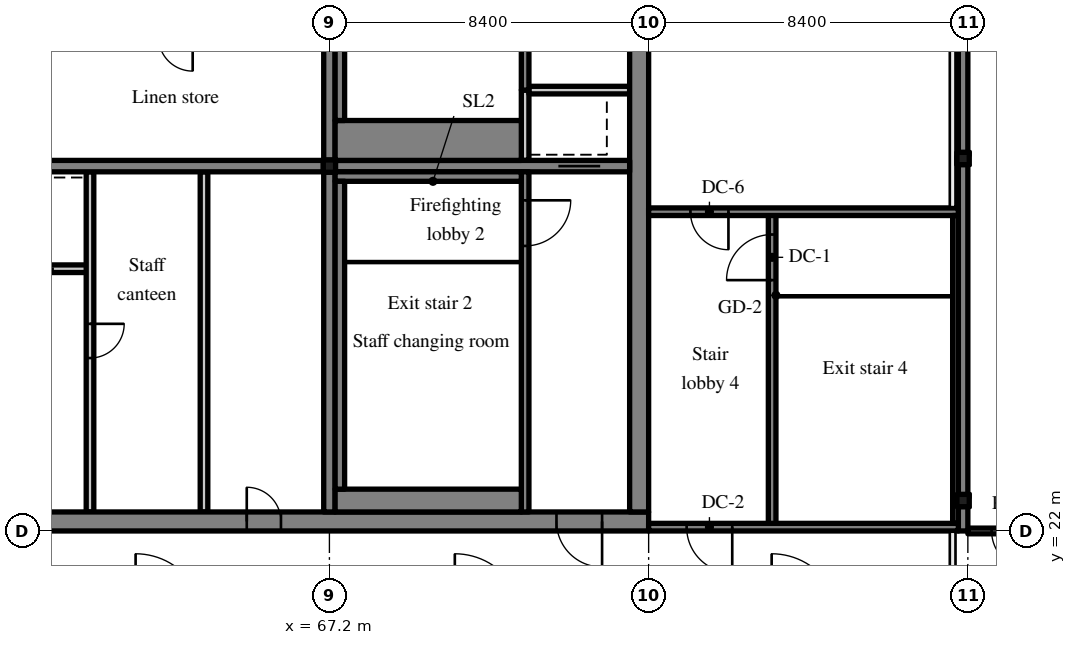
"""IFC4 building model, lengths in metres.
Left out: names, types, materials, properties, quantities, classifications, styles, units other than length and angle.
Written with IfcOpenShell. Run it as: python <this file> out.ifc"""

import sys

from ifc_helpers import new_model, si_unit, direction, frame, frame_2d, origin, origin_2d, place, context, subcontext, project, spatial, rectangle, hollow_circle, extrude, source, transform, mapped, element, fill, save


model = new_model("IFC4")
c1 = context("Model", 3, precision=1e-05, world=origin(), true_north=direction((0.0, 1.0)))
c2 = subcontext(c1, "Body", "Model", "MODEL_VIEW")
j1 = project(units=[si_unit("LENGTHUNIT", "METRE"), si_unit("PLANEANGLEUNIT", "RADIAN")], contexts=[c1])
p1 = place(None, origin())
s1 = spatial("IfcSite", under=j1, at=p1, CompositionType="ELEMENT")
p2 = place(p1, origin())
s2 = spatial("IfcBuilding", under=s1, at=p2, CompositionType="ELEMENT")
p3 = place(p2, frame((0.0, 0.0, 329.7)))
s3 = spatial("IfcBuildingStorey", under=s2, at=p3, CompositionType="ELEMENT", Elevation=329.7)
m1 = source(origin(), c2, "Body", "SweptSolid", [
    extrude(rectangle(XDim=50.4, YDim=0.5, at=frame_2d((25.2, 0.0))), origin(), (0.0, 0.0, 1.0), 4.72),
])
p4 = place(p3, frame((25.2, 22.25, 0.0), z_axis=(0.0, 0.0, 1.0), x_axis=(1.0, 0.0, 0.0)))
e1 = element("IfcWall", 1, at=p4, inside=s3, PredefinedType="SHEAR", context=c2, shape_type="MappedRepresentation", body=[
    mapped(m1, transform((0.0, 0.0, 0.0), scale=1.0)),
])
m2 = source(origin(), c2, "Body", "SweptSolid", [
    extrude(rectangle(XDim=1.8, YDim=2.1, at=frame_2d((0.9, 1.05))), frame((0.0, 0.26, 0.0), z_axis=(0.0, -1.0, 0.0), x_axis=(1.0, 0.0, 0.0)), (0.0, 0.0, 1.0), 0.52),
])
p5 = place(p4, frame((15.9, 0.0, 0.0)))
e2 = element("IfcOpeningElement", 2, at=p5, cuts=e1, PredefinedType="OPENING", context=c2, shape_type="MappedRepresentation", body=[
    mapped(m2, transform((0.0, 0.0, 0.0), scale=1.0)),
])
m3 = source(origin(), c2, "Body", "SweptSolid", [
    extrude(rectangle(XDim=0.9, YDim=2.1, at=frame_2d((0.45, 1.05))), frame((0.0, 0.26, 0.0), z_axis=(0.0, -1.0, 0.0), x_axis=(1.0, 0.0, 0.0)), (0.0, 0.0, 1.0), 0.52),
])
p6 = place(p4, frame((21.525, 0.0, 0.0)))
e3 = element("IfcOpeningElement", 3, at=p6, cuts=e1, PredefinedType="OPENING", context=c2, shape_type="MappedRepresentation", body=[
    mapped(m3, transform((0.0, 0.0, 0.0), scale=1.0)),
])
p7 = place(p4, frame((32.7, 0.0, 0.0)))
e4 = element("IfcOpeningElement", 4, at=p7, cuts=e1, PredefinedType="OPENING", context=c2, shape_type="MappedRepresentation", body=[
    mapped(m2, transform((0.0, 0.0, 0.0), scale=1.0)),
])
p8 = place(p4, frame((39.825, 0.0, 0.0)))
e5 = element("IfcOpeningElement", 5, at=p8, cuts=e1, PredefinedType="OPENING", context=c2, shape_type="MappedRepresentation", body=[
    mapped(m3, transform((0.0, 0.0, 0.0), scale=1.0)),
])
p9 = place(p4, frame((27.975, 0.0, 0.0)))
e6 = element("IfcOpeningElement", 6, at=p9, cuts=e1, PredefinedType="OPENING", context=c2, shape_type="MappedRepresentation", body=[
    mapped(m3, transform((0.0, 0.0, 0.0), scale=1.0)),
])
m4 = source(origin(), c2, "Body", "SweptSolid", [
    extrude(rectangle(XDim=1.2, YDim=2.1, at=frame_2d((0.6, 1.05))), frame((0.0, 0.26, 0.0), z_axis=(0.0, -1.0, 0.0), x_axis=(1.0, 0.0, 0.0)), (0.0, 0.0, 1.0), 0.52),
])
p10 = place(p4, frame((6.5, 0.0, 0.0)))
e7 = element("IfcOpeningElement", 7, at=p10, cuts=e1, PredefinedType="OPENING", context=c2, shape_type="MappedRepresentation", body=[
    mapped(m4, transform((0.0, 0.0, 0.0), scale=1.0)),
])
p11 = place(p4, frame((47.975, 0.0, 0.0)))
e8 = element("IfcOpeningElement", 8, at=p11, cuts=e1, PredefinedType="OPENING", context=c2, shape_type="MappedRepresentation", body=[
    mapped(m4, transform((0.0, 0.0, 0.0), scale=1.0)),
])
m5 = source(origin(), c2, "Body", "SweptSolid", [
    extrude(rectangle(XDim=19.0, YDim=0.5, at=frame_2d((9.5, 0.0))), origin(), (0.0, 0.0, 1.0), 4.72),
])
p12 = place(p3, frame((75.35, 22.5, 0.0), z_axis=(0.0, 0.0, 1.0), x_axis=(0.0, 1.0, 0.0)))
e9 = element("IfcWall", 9, at=p12, inside=s3, PredefinedType="SHEAR", context=c2, shape_type="MappedRepresentation", body=[
    mapped(m5, transform((0.0, 0.0, 0.0), scale=1.0)),
])
p13 = place(p12, frame((12.9, 0.0, 0.0)))
e10 = element("IfcOpeningElement", 10, at=p13, cuts=e9, PredefinedType="OPENING", context=c2, shape_type="MappedRepresentation", body=[
    mapped(m4, transform((0.0, 0.0, 0.0), scale=1.0)),
])
m6 = source(origin(), c2, "Body", "SweptSolid", [
    extrude(rectangle(XDim=19.0, YDim=0.3, at=frame_2d((9.5, 0.0))), origin(), (0.0, 0.0, 1.0), 4.72),
])
p14 = place(p3, frame((67.2, 22.5, 0.0), z_axis=(0.0, 0.0, 1.0), x_axis=(0.0, 1.0, 0.0)))
e11 = element("IfcWall", 11, at=p14, inside=s3, PredefinedType="SHEAR", context=c2, shape_type="MappedRepresentation", body=[
    mapped(m6, transform((0.0, 0.0, 0.0), scale=1.0)),
])
m7 = source(origin(), c2, "Body", "SweptSolid", [
    extrude(rectangle(XDim=16.5, YDim=0.3, at=frame_2d((8.25, 0.0))), origin(), (0.0, 0.0, 1.0), 4.72),
])
p15 = place(p3, frame((50.55, 31.6, 0.0), z_axis=(0.0, 0.0, 1.0), x_axis=(1.0, 0.0, 0.0)))
e12 = element("IfcWall", 12, at=p15, inside=s3, PredefinedType="SHEAR", context=c2, shape_type="MappedRepresentation", body=[
    mapped(m7, transform((0.0, 0.0, 0.0), scale=1.0)),
])
m8 = source(origin(), c2, "Body", "SweptSolid", [
    extrude(rectangle(XDim=1.0, YDim=2.1, at=frame_2d((0.5, 1.05))), frame((0.0, 0.16, 0.0), z_axis=(0.0, -1.0, 0.0), x_axis=(1.0, 0.0, 0.0)), (0.0, 0.0, 1.0), 0.32),
])
p16 = place(p15, frame((0.625, 0.0, 0.0)))
e13 = element("IfcOpeningElement", 13, at=p16, cuts=e12, PredefinedType="OPENING", context=c2, shape_type="MappedRepresentation", body=[
    mapped(m8, transform((0.0, 0.0, 0.0), scale=1.0)),
])
m9 = source(origin(), c2, "Body", "SweptSolid", [
    extrude(rectangle(XDim=7.75, YDim=0.3, at=frame_2d((3.875, 0.0))), origin(), (0.0, 0.0, 1.0), 4.72),
])
p17 = place(p3, frame((67.35, 31.6, 0.0), z_axis=(0.0, 0.0, 1.0), x_axis=(1.0, 0.0, 0.0)))
e14 = element("IfcWall", 14, at=p17, inside=s3, PredefinedType="SHEAR", context=c2, shape_type="MappedRepresentation", body=[
    mapped(m9, transform((0.0, 0.0, 0.0), scale=1.0)),
])
m10 = source(origin(), c2, "Body", "SweptSolid", [
    extrude(rectangle(XDim=1.1, YDim=2.1, at=frame_2d((0.55, 1.05))), frame((0.0, 0.16, 0.0), z_axis=(0.0, -1.0, 0.0), x_axis=(1.0, 0.0, 0.0)), (0.0, 0.0, 1.0), 0.32),
])
p18 = place(p17, frame((5.875, 0.0, 0.0)))
e15 = element("IfcOpeningElement", 15, at=p18, cuts=e14, PredefinedType="OPENING", context=c2, shape_type="MappedRepresentation", body=[
    mapped(m10, transform((0.0, 0.0, 0.0), scale=1.0)),
])
m11 = source(origin(), c2, "Body", "SweptSolid", [
    extrude(rectangle(XDim=18.4, YDim=0.25, at=frame_2d((9.2, 0.0))), origin(), (0.0, 0.0, 1.0), 4.72),
])
p19 = place(p3, frame((83.875, 22.0, 0.0), z_axis=(0.0, 0.0, 1.0), x_axis=(0.0, 1.0, 0.0)))
e16 = element("IfcWall", 16, at=p19, inside=s3, PredefinedType="SHEAR", context=c2, shape_type="MappedRepresentation", body=[
    mapped(m11, transform((0.0, 0.0, 0.0), scale=1.0)),
])
m12 = source(origin(), c2, "Body", "SweptSolid", [
    extrude(hollow_circle(Radius=0.162, WallThickness=0.012, at=origin_2d()), origin(), (0.0, 0.0, 1.0), 4.4),
])
for number, where, z_axis, x_axis in (
    (17, (83.875, 22.8, 5.0), (0.0, 0.0, 1.0), (1.0, 0.0, 0.0)),
    (18, (83.875, 31.8, 5.0), (0.0, 0.0, 1.0), (1.0, 0.0, 0.0)),
    (19, (67.2, 31.6, 5.0), (0.0, 0.0, 1.0), (1.0, 0.0, 0.0)),
):
    element("IfcColumn", number, at=place(p3, frame(where, z_axis=z_axis, x_axis=x_axis)), inside=s3, PredefinedType="COLUMN", context=c2, shape_type="MappedRepresentation", body=[
        mapped(m12, transform((0.0, 0.0, 0.0), scale=1.0)),
    ])
m13 = source(origin(), c2, "Body", "SweptSolid", [
    extrude(rectangle(XDim=6.0, YDim=0.2, at=frame_2d((3.0, 0.0))), origin(), (0.0, 0.0, 1.0), 4.72),
])
p20 = place(p3, frame((60.9, 28.9, 0.0), z_axis=(0.0, 0.0, 1.0), x_axis=(-1.0, 0.0, 0.0)))
e20 = element("IfcWall", 20, at=p20, inside=s3, PredefinedType="SOLIDWALL", context=c2, shape_type="MappedRepresentation", body=[
    mapped(m13, transform((0.0, 0.0, 0.0), scale=1.0)),
])
m14 = source(origin(), c2, "Body", "SweptSolid", [
    extrude(rectangle(XDim=1.1, YDim=2.1, at=frame_2d((0.55, 1.05))), frame((0.0, 0.11, 0.0), z_axis=(0.0, -1.0, 0.0), x_axis=(1.0, 0.0, 0.0)), (0.0, 0.0, 1.0), 0.22),
])
p21 = place(p20, frame((0.95, 0.0, 0.0)))
e21 = element("IfcOpeningElement", 21, at=p21, cuts=e20, PredefinedType="OPENING", context=c2, shape_type="MappedRepresentation", body=[
    mapped(m14, transform((0.0, 0.0, 0.0), scale=1.0)),
])
p22 = place(p20, frame((3.95, 0.0, 0.0)))
e22 = element("IfcOpeningElement", 22, at=p22, cuts=e20, PredefinedType="OPENING", context=c2, shape_type="MappedRepresentation", body=[
    mapped(m14, transform((0.0, 0.0, 0.0), scale=1.0)),
])
m15 = source(origin(), c2, "Body", "SweptSolid", [
    extrude(rectangle(XDim=8.95, YDim=0.2, at=frame_2d((4.475, 0.0))), origin(), (0.0, 0.0, 1.0), 4.72),
])
p23 = place(p3, frame((60.9, 22.5, 0.0), z_axis=(0.0, 0.0, 1.0), x_axis=(0.0, 1.0, 0.0)))
e23 = element("IfcWall", 23, at=p23, inside=s3, PredefinedType="PARTITIONING", context=c2, shape_type="MappedRepresentation", body=[
    mapped(m15, transform((0.0, 0.0, 0.0), scale=1.0)),
])
m16 = source(origin(), c2, "Body", "SweptSolid", [
    extrude(rectangle(XDim=0.9, YDim=2.1, at=frame_2d((0.45, 1.05))), frame((0.0, 0.11, 0.0), z_axis=(0.0, -1.0, 0.0), x_axis=(1.0, 0.0, 0.0)), (0.0, 0.0, 1.0), 0.22),
])
p24 = place(p23, frame((4.05, 0.0, 0.0)))
e24 = element("IfcOpeningElement", 24, at=p24, cuts=e23, PredefinedType="OPENING", context=c2, shape_type="MappedRepresentation", body=[
    mapped(m16, transform((0.0, 0.0, 0.0), scale=1.0)),
])
p25 = place(p3, frame((63.9, 22.5, 0.0), z_axis=(0.0, 0.0, 1.0), x_axis=(0.0, 1.0, 0.0)))
e25 = element("IfcWall", 25, at=p25, inside=s3, PredefinedType="PARTITIONING", context=c2, shape_type="MappedRepresentation", body=[
    mapped(m15, transform((0.0, 0.0, 0.0), scale=1.0)),
])
m17 = source(origin(), c2, "Body", "SweptSolid", [
    extrude(rectangle(XDim=8.95, YDim=0.2, at=frame_2d((4.475, 0.0))), origin(), (0.0, 0.0, 1.0), 4.72),
])
p26 = place(p3, frame((72.35, 22.5, 0.0), z_axis=(0.0, 0.0, 1.0), x_axis=(0.0, 1.0, 0.0)))
e26 = element("IfcWall", 26, at=p26, inside=s3, PredefinedType="SOLIDWALL", context=c2, shape_type="MappedRepresentation", body=[
    mapped(m17, transform((0.0, 0.0, 0.0), scale=1.0)),
])
m18 = source(origin(), c2, "Body", "SweptSolid", [
    extrude(rectangle(XDim=1.2, YDim=2.1, at=frame_2d((0.6, 1.05))), frame((0.0, 0.11, 0.0), z_axis=(0.0, -1.0, 0.0), x_axis=(1.0, 0.0, 0.0)), (0.0, 0.0, 1.0), 0.22),
])
p27 = place(p26, frame((7.0, 0.0, 0.0)))
e27 = element("IfcOpeningElement", 27, at=p27, cuts=e26, PredefinedType="OPENING", context=c2, shape_type="MappedRepresentation", body=[
    mapped(m18, transform((0.0, 0.0, 0.0), scale=1.0)),
])
m19 = source(origin(), c2, "Body", "SweptSolid", [
    extrude(rectangle(XDim=1.85, YDim=0.2, at=frame_2d((0.925, 0.0))), origin(), (0.0, 0.0, 1.0), 4.72),
])
p28 = place(p3, frame((72.35, 31.75, 0.0), z_axis=(0.0, 0.0, 1.0), x_axis=(0.0, 1.0, 0.0)))
e28 = element("IfcWall", 28, at=p28, inside=s3, PredefinedType="SOLIDWALL", context=c2, shape_type="MappedRepresentation", body=[
    mapped(m19, transform((0.0, 0.0, 0.0), scale=1.0)),
])
m20 = source(origin(), c2, "Body", "SweptSolid", [
    extrude(rectangle(XDim=2.65, YDim=0.2, at=frame_2d((1.325, 0.0))), origin(), (0.0, 0.0, 1.0), 4.72),
])
p29 = place(p3, frame((72.45, 33.6, 0.0), z_axis=(0.0, 0.0, 1.0), x_axis=(1.0, 0.0, 0.0)))
e29 = element("IfcWall", 29, at=p29, inside=s3, PredefinedType="SOLIDWALL", context=c2, shape_type="MappedRepresentation", body=[
    mapped(m20, transform((0.0, 0.0, 0.0), scale=1.0)),
])
m21 = source(origin(), c2, "Body", "SweptSolid", [
    extrude(rectangle(XDim=7.9, YDim=0.2, at=frame_2d((3.95, 0.0))), origin(), (0.0, 0.0, 1.0), 4.72),
])
p30 = place(p3, frame((72.35, 33.6, 0.0), z_axis=(0.0, 0.0, 1.0), x_axis=(0.0, 1.0, 0.0)))
e30 = element("IfcWall", 30, at=p30, inside=s3, PredefinedType="SOLIDWALL", context=c2, shape_type="MappedRepresentation", body=[
    mapped(m21, transform((0.0, 0.0, 0.0), scale=1.0)),
])
m22 = source(origin(), c2, "Body", "SweptSolid", [
    extrude(rectangle(XDim=1.8, YDim=2.1, at=frame_2d((0.9, 1.05))), frame((0.0, 0.11, 0.0), z_axis=(0.0, -1.0, 0.0), x_axis=(1.0, 0.0, 0.0)), (0.0, 0.0, 1.0), 0.22),
])
p31 = place(p30, frame((5.3, 0.0, 0.0)))
e31 = element("IfcOpeningElement", 31, at=p31, cuts=e30, PredefinedType="OPENING", context=c2, shape_type="MappedRepresentation", body=[
    mapped(m22, transform((0.0, 0.0, 0.0), scale=1.0)),
])
m23 = source(origin(), c2, "Body", "SweptSolid", [
    extrude(rectangle(XDim=8.3, YDim=0.2, at=frame_2d((4.15, 0.0))), origin(), (0.0, 0.0, 1.0), 4.72),
])
p32 = place(p3, frame((78.85, 22.1, 0.0), z_axis=(0.0, 0.0, 1.0), x_axis=(0.0, 1.0, 0.0)))
e32 = element("IfcWall", 32, at=p32, inside=s3, PredefinedType="SOLIDWALL", context=c2, shape_type="MappedRepresentation", body=[
    mapped(m23, transform((0.0, 0.0, 0.0), scale=1.0)),
])
p33 = place(p32, frame((6.5, 0.0, 0.0)))
e33 = element("IfcOpeningElement", 33, at=p33, cuts=e32, PredefinedType="OPENING", context=c2, shape_type="MappedRepresentation", body=[
    mapped(m18, transform((0.0, 0.0, 0.0), scale=1.0)),
])
m24 = source(origin(), c2, "Body", "SweptSolid", [
    extrude(rectangle(XDim=8.15, YDim=0.2, at=frame_2d((4.075, 0.0))), origin(), (0.0, 0.0, 1.0), 4.72),
])
p34 = place(p3, frame((83.75, 22.1, 0.0), z_axis=(0.0, 0.0, 1.0), x_axis=(-1.0, 0.0, 0.0)))
e34 = element("IfcWall", 34, at=p34, inside=s3, PredefinedType="SOLIDWALL", context=c2, shape_type="MappedRepresentation", body=[
    mapped(m24, transform((0.0, 0.0, 0.0), scale=1.0)),
])
p35 = place(p34, frame((5.95, 0.0, 0.0)))
e35 = element("IfcOpeningElement", 35, at=p35, cuts=e34, PredefinedType="OPENING", context=c2, shape_type="MappedRepresentation", body=[
    mapped(m18, transform((0.0, 0.0, 0.0), scale=1.0)),
])
p36 = place(p3, frame((83.75, 30.4, 0.0), z_axis=(0.0, 0.0, 1.0), x_axis=(-1.0, 0.0, 0.0)))
e36 = element("IfcWall", 36, at=p36, inside=s3, PredefinedType="SOLIDWALL", context=c2, shape_type="MappedRepresentation", body=[
    mapped(m24, transform((0.0, 0.0, 0.0), scale=1.0)),
])
m25 = source(origin(), c2, "Body", "SweptSolid", [
    extrude(rectangle(XDim=1.0, YDim=2.1, at=frame_2d((0.5, 1.05))), frame((0.0, 0.11, 0.0), z_axis=(0.0, -1.0, 0.0), x_axis=(1.0, 0.0, 0.0)), (0.0, 0.0, 1.0), 0.22),
])
p37 = place(p36, frame((6.05, 0.0, 0.0)))
e37 = element("IfcOpeningElement", 37, at=p37, cuts=e36, PredefinedType="OPENING", context=c2, shape_type="MappedRepresentation", body=[
    mapped(m25, transform((0.0, 0.0, 0.0), scale=1.0)),
])
m26 = source(origin(), c2, "Body", "SweptSolid", [
    extrude(rectangle(XDim=4.9, YDim=0.6, at=frame_2d((2.45, 0.0))), origin(), (0.0, 0.0, 1.0), 4.72),
])
p38 = place(p3, frame((67.35, 22.8, 0.0), z_axis=(0.0, 0.0, 1.0), x_axis=(1.0, 0.0, 0.0)))
e38 = element("IfcWall", 38, at=p38, inside=s3, PredefinedType="SOLIDWALL", context=c2, shape_type="MappedRepresentation", body=[
    mapped(m26, transform((0.0, 0.0, 0.0), scale=1.0)),
])
m27 = source(origin(), c2, "Body", "SweptSolid", [
    extrude(rectangle(XDim=4.9, YDim=0.25, at=frame_2d((2.45, 0.0))), origin(), (0.0, 0.0, 1.0), 4.72),
])
p39 = place(p3, frame((67.35, 31.325, 0.0), z_axis=(0.0, 0.0, 1.0), x_axis=(1.0, 0.0, 0.0)))
e39 = element("IfcWall", 39, at=p39, inside=s3, PredefinedType="SOLIDWALL", context=c2, shape_type="MappedRepresentation", body=[
    mapped(m27, transform((0.0, 0.0, 0.0), scale=1.0)),
])
m28 = source(origin(), c2, "Body", "SweptSolid", [
    extrude(rectangle(XDim=8.1, YDim=0.25, at=frame_2d((4.05, 0.0))), origin(), (0.0, 0.0, 1.0), 4.72),
])
p40 = place(p3, frame((67.475, 23.1, 0.0), z_axis=(0.0, 0.0, 1.0), x_axis=(0.0, 1.0, 0.0)))
e40 = element("IfcWall", 40, at=p40, inside=s3, PredefinedType="SOLIDWALL", context=c2, shape_type="MappedRepresentation", body=[
    mapped(m28, transform((0.0, 0.0, 0.0), scale=1.0)),
])
m29 = source(origin(), c2, "Body", "SweptSolid", [
    extrude(rectangle(XDim=4.9, YDim=1.05, at=frame_2d((2.45, 0.0))), origin(), (0.0, 0.0, 1.0), 4.72),
])
p41 = place(p3, frame((67.35, 32.275, 0.0), z_axis=(0.0, 0.0, 1.0), x_axis=(1.0, 0.0, 0.0)))
e41 = element("IfcWall", 41, at=p41, inside=s3, PredefinedType="SOLIDWALL", context=c2, shape_type="MappedRepresentation", body=[
    mapped(m29, transform((0.0, 0.0, 0.0), scale=1.0)),
])
p42 = place(p3, frame((67.475, 32.8, 0.0), z_axis=(0.0, 0.0, 1.0), x_axis=(0.0, 1.0, 0.0)))
e42 = element("IfcWall", 42, at=p42, inside=s3, PredefinedType="SOLIDWALL", context=c2, shape_type="MappedRepresentation", body=[
    mapped(m28, transform((0.0, 0.0, 0.0), scale=1.0)),
])
m30 = source(origin(), c2, "Body", "SweptSolid", [
    extrude(rectangle(XDim=8.1, YDim=0.15, at=frame_2d((4.05, 0.0))), origin(), (0.0, 0.0, 1.0), 4.72),
])
p43 = place(p3, frame((83.675, 22.2, 0.0), z_axis=(0.0, 0.0, 1.0), x_axis=(0.0, 1.0, 0.0)))
e43 = element("IfcWall", 43, at=p43, inside=s3, PredefinedType="SOLIDWALL", context=c2, shape_type="MappedRepresentation", body=[
    mapped(m30, transform((0.0, 0.0, 0.0), scale=1.0)),
])
m31 = source(origin(), c2, "Body", "SweptSolid", [
    extrude(rectangle(XDim=2.2, YDim=0.15, at=frame_2d((1.1, 0.0))), origin(), (0.0, 0.0, 1.0), 4.02),
])
p44 = place(p3, frame((84.0, 22.0, 0.0), z_axis=(0.0, 0.0, 1.0), x_axis=(1.0, 0.0, 0.0)))
e44 = element("IfcWall", 44, at=p44, inside=s3, PredefinedType="PARTITIONING", context=c2, shape_type="MappedRepresentation", body=[
    mapped(m31, transform((0.0, 0.0, 0.0), scale=1.0)),
])
m32 = source(origin(), c2, "Body", "SweptSolid", [
    extrude(rectangle(XDim=1.0, YDim=2.1, at=frame_2d((0.5, 1.05))), frame((0.0, 0.085, 0.0), z_axis=(0.0, -1.0, 0.0), x_axis=(1.0, 0.0, 0.0)), (0.0, 0.0, 1.0), 0.17),
])
p45 = place(p44, frame((0.625, 0.0, 0.0)))
e45 = element("IfcOpeningElement", 45, at=p45, cuts=e44, PredefinedType="OPENING", context=c2, shape_type="MappedRepresentation", body=[
    mapped(m32, transform((0.0, 0.0, 0.0), scale=1.0)),
])
m33 = source(origin(), c2, "Body", "SweptSolid", [
    extrude(rectangle(XDim=1.1, YDim=2.1, at=frame_2d((0.55, 1.05))), frame((0.0, 0.025, 0.0), z_axis=(0.0, -1.0, 0.0), x_axis=(1.0, 0.0, 0.0)), (0.0, 0.0, 1.0), 0.05),
])
p46 = place(p21, origin())
e46 = element("IfcDoor", 46, at=p46, inside=s3, OperationType="SLIDING_TO_RIGHT", PredefinedType="DOOR", context=c2, shape_type="MappedRepresentation", body=[
    mapped(m33, transform((0.0, 0.0, 0.0), scale=1.0)),
])
fill(e21, e46)
m34 = source(origin(), c2, "Body", "SweptSolid", [
    extrude(rectangle(XDim=0.9, YDim=2.1, at=frame_2d((0.45, 1.05))), frame((0.0, 0.175, 0.0), z_axis=(0.0, -1.0, 0.0), x_axis=(1.0, 0.0, 0.0)), (0.0, 0.0, 1.0), 0.05),
])
p47 = place(p8, origin())
e47 = element("IfcDoor", 47, at=p47, inside=s3, OperationType="SINGLE_SWING_LEFT", PredefinedType="DOOR", context=c2, shape_type="MappedRepresentation", body=[
    mapped(m34, transform((0.0, 0.0, 0.0), scale=1.0)),
])
fill(e5, e47)
m35 = source(origin(), c2, "Body", "SweptSolid", [
    extrude(rectangle(XDim=0.9, YDim=2.1, at=frame_2d((0.45, 1.05))), frame((0.0, 0.025, 0.0), z_axis=(0.0, -1.0, 0.0), x_axis=(1.0, 0.0, 0.0)), (0.0, 0.0, 1.0), 0.05),
])
p48 = place(p24, origin())
e48 = element("IfcDoor", 48, at=p48, inside=s3, OperationType="SINGLE_SWING_RIGHT", PredefinedType="DOOR", context=c2, shape_type="MappedRepresentation", body=[
    mapped(m35, transform((0.0, 0.0, 0.0), scale=1.0)),
])
fill(e24, e48)
m36 = source(origin(), c2, "Body", "SweptSolid", [
    extrude(rectangle(XDim=1.2, YDim=2.1, at=frame_2d((0.6, 1.05))), frame((0.0, 0.025, 0.0), z_axis=(0.0, -1.0, 0.0), x_axis=(1.0, 0.0, 0.0)), (0.0, 0.0, 1.0), 0.05),
])
p49 = place(p27, origin())
e49 = element("IfcDoor", 49, at=p49, inside=s3, OperationType="SINGLE_SWING_RIGHT", PredefinedType="DOOR", context=c2, shape_type="MappedRepresentation", body=[
    mapped(m36, transform((0.0, 0.0, 0.0), scale=1.0)),
])
fill(e27, e49)
m37 = source(origin(), c2, "Body", "SweptSolid", [
    extrude(rectangle(XDim=1.2, YDim=2.1, at=frame_2d((0.6, 1.05))), frame((0.0, 0.175, 0.0), z_axis=(0.0, -1.0, 0.0), x_axis=(1.0, 0.0, 0.0)), (0.0, 0.0, 1.0), 0.05),
])
p50 = place(p11, origin())
e50 = element("IfcDoor", 50, at=p50, inside=s3, OperationType="SINGLE_SWING_RIGHT", PredefinedType="DOOR", context=c2, shape_type="MappedRepresentation", body=[
    mapped(m37, transform((0.0, 0.0, 0.0), scale=1.0)),
])
fill(e8, e50)
p51 = place(p18, origin())
e51 = element("IfcDoor", 51, at=p51, inside=s3, OperationType="SLIDING_TO_LEFT", PredefinedType="DOOR", context=c2, shape_type="MappedRepresentation", body=[
    mapped(m33, transform((0.0, 0.0, 0.0), scale=1.0)),
])
fill(e15, e51)
p52 = place(p33, origin())
e52 = element("IfcDoor", 52, at=p52, inside=s3, OperationType="SINGLE_SWING_LEFT", PredefinedType="DOOR", context=c2, shape_type="MappedRepresentation", body=[
    mapped(m36, transform((0.0, 0.0, 0.0), scale=1.0)),
])
fill(e33, e52)
p53 = place(p35, origin())
e53 = element("IfcDoor", 53, at=p53, inside=s3, OperationType="SINGLE_SWING_LEFT", PredefinedType="DOOR", context=c2, shape_type="MappedRepresentation", body=[
    mapped(m36, transform((0.0, 0.0, 0.0), scale=1.0)),
])
fill(e35, e53)
m38 = source(origin(), c2, "Body", "SweptSolid", [
    extrude(rectangle(XDim=1.0, YDim=2.1, at=frame_2d((0.5, 1.05))), frame((0.0, 0.025, 0.0), z_axis=(0.0, -1.0, 0.0), x_axis=(1.0, 0.0, 0.0)), (0.0, 0.0, 1.0), 0.05),
])
p54 = place(p37, origin())
e54 = element("IfcDoor", 54, at=p54, inside=s3, OperationType="SINGLE_SWING_LEFT", PredefinedType="DOOR", context=c2, shape_type="MappedRepresentation", body=[
    mapped(m38, transform((0.0, 0.0, 0.0), scale=1.0)),
])
fill(e37, e54)
p55 = place(p45, origin())
e55 = element("IfcDoor", 55, at=p55, inside=s3, OperationType="SINGLE_SWING_RIGHT", PredefinedType="DOOR", context=c2, shape_type="MappedRepresentation", body=[
    mapped(m38, transform((0.0, 0.0, 0.0), scale=1.0)),
])
fill(e45, e55)
save(model, sys.argv[1])
